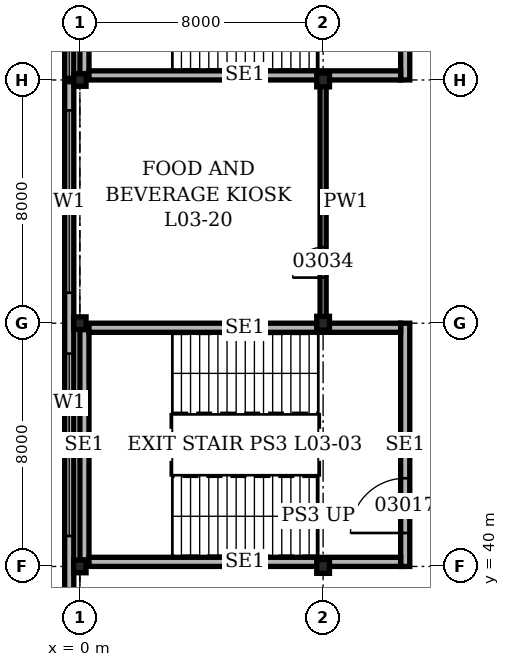
"""IFC4 building model, lengths in metres.
Left out: names, types, materials, properties, quantities, classifications, styles, units other than length and angle.
Written with IfcOpenShell. Run it as: python <this file> out.ifc"""

import sys

from ifc_helpers import new_model, si_unit, direction, frame, frame_2d, origin, origin_2d, place, context, subcontext, project, spatial, rectangle, i_section, extrude, element, fill, save


model = new_model("IFC4")
c1 = context("Model", 3, precision=1e-05, world=origin(), true_north=direction((0.0, 1.0)))
c2 = subcontext(c1, "Body", "Model", "MODEL_VIEW")
j1 = project(units=[si_unit("LENGTHUNIT", "METRE"), si_unit("PLANEANGLEUNIT", "RADIAN")], contexts=[c1])
p1 = place(None, origin())
s1 = spatial("IfcSite", under=j1, at=p1, CompositionType="ELEMENT")
p2 = place(p1, origin())
s2 = spatial("IfcBuilding", under=s1, at=p2, CompositionType="ELEMENT")
p3 = place(p2, frame((0.0, 0.0, 14.9)))
s3 = spatial("IfcBuildingStorey", under=s2, at=p3, CompositionType="ELEMENT", Elevation=14.9)
for number, where, z_axis, x_axis in (
    (1, (0.0, 40.0, 0.0), (0.0, 0.0, 1.0), (1.0, 0.0, 0.0)),
    (2, (0.0, 48.0, 0.0), (0.0, 0.0, 1.0), (1.0, 0.0, 0.0)),
    (3, (0.0, 56.0, 0.0), (0.0, 0.0, 1.0), (1.0, 0.0, 0.0)),
):
    element("IfcColumn", number, at=place(p3, frame(where, z_axis=z_axis, x_axis=x_axis)), inside=s3, PredefinedType="COLUMN", context=c2, shape_type="SweptSolid", body=[
        extrude(i_section(OverallWidth=0.406, OverallDepth=0.417, WebThickness=0.03, FlangeThickness=0.048, at=origin_2d()), origin(), (0.0, 0.0, 1.0), 5.0),
    ])
for number, where, z_axis, x_axis in (
    (4, (8.0, 40.0, 0.0), (0.0, 0.0, 1.0), (1.0, 0.0, 0.0)),
    (5, (8.0, 48.0, 0.0), (0.0, 0.0, 1.0), (1.0, 0.0, 0.0)),
    (6, (8.0, 56.0, 0.0), (0.0, 0.0, 1.0), (1.0, 0.0, 0.0)),
):
    element("IfcColumn", number, at=place(p3, frame(where, z_axis=z_axis, x_axis=x_axis)), inside=s3, PredefinedType="COLUMN", context=c2, shape_type="SweptSolid", body=[
        extrude(i_section(OverallWidth=0.419, OverallDepth=0.455, WebThickness=0.042, FlangeThickness=0.068, at=origin_2d()), origin(), (0.0, 0.0, 1.0), 5.0),
    ])
p4 = place(p3, frame((-0.35, 112.35, 0.0), z_axis=(0.0, 0.0, 1.0), x_axis=(0.0, -1.0, 0.0)))
e7 = element("IfcWall", 7, at=p4, inside=s3, PredefinedType="SOLIDWALL", context=c2, shape_type="SweptSolid", body=[
    extrude(rectangle(XDim=112.7, YDim=0.3, at=frame_2d((56.35, 0.0))), origin(), (0.0, 0.0, 1.0), 5.0),
])
p5 = place(p4, frame((1.35, 0.0, 1.0)))
e8 = element("IfcOpeningElement", 8, at=p5, cuts=e7, PredefinedType="OPENING", context=c2, shape_type="SweptSolid", body=[
    extrude(rectangle(XDim=6.0, YDim=1.5, at=frame_2d((3.0, 0.75))), frame((0.0, 0.16, 0.0), z_axis=(0.0, -1.0, 0.0), x_axis=(1.0, 0.0, 0.0)), (0.0, 0.0, 1.0), 0.32),
])
p6 = place(p4, frame((9.35, 0.0, 1.0)))
e9 = element("IfcOpeningElement", 9, at=p6, cuts=e7, PredefinedType="OPENING", context=c2, shape_type="SweptSolid", body=[
    extrude(rectangle(XDim=6.0, YDim=1.5, at=frame_2d((3.0, 0.75))), frame((0.0, 0.16, 0.0), z_axis=(0.0, -1.0, 0.0), x_axis=(1.0, 0.0, 0.0)), (0.0, 0.0, 1.0), 0.32),
])
p7 = place(p4, frame((17.35, 0.0, 1.0)))
e10 = element("IfcOpeningElement", 10, at=p7, cuts=e7, PredefinedType="OPENING", context=c2, shape_type="SweptSolid", body=[
    extrude(rectangle(XDim=6.0, YDim=1.5, at=frame_2d((3.0, 0.75))), frame((0.0, 0.16, 0.0), z_axis=(0.0, -1.0, 0.0), x_axis=(1.0, 0.0, 0.0)), (0.0, 0.0, 1.0), 0.32),
])
p8 = place(p4, frame((25.35, 0.0, 1.0)))
e11 = element("IfcOpeningElement", 11, at=p8, cuts=e7, PredefinedType="OPENING", context=c2, shape_type="SweptSolid", body=[
    extrude(rectangle(XDim=6.0, YDim=1.5, at=frame_2d((3.0, 0.75))), frame((0.0, 0.16, 0.0), z_axis=(0.0, -1.0, 0.0), x_axis=(1.0, 0.0, 0.0)), (0.0, 0.0, 1.0), 0.32),
])
p9 = place(p4, frame((33.35, 0.0, 1.0)))
e12 = element("IfcOpeningElement", 12, at=p9, cuts=e7, PredefinedType="OPENING", context=c2, shape_type="SweptSolid", body=[
    extrude(rectangle(XDim=6.0, YDim=1.5, at=frame_2d((3.0, 0.75))), frame((0.0, 0.16, 0.0), z_axis=(0.0, -1.0, 0.0), x_axis=(1.0, 0.0, 0.0)), (0.0, 0.0, 1.0), 0.32),
])
p10 = place(p4, frame((41.35, 0.0, 1.0)))
e13 = element("IfcOpeningElement", 13, at=p10, cuts=e7, PredefinedType="OPENING", context=c2, shape_type="SweptSolid", body=[
    extrude(rectangle(XDim=6.0, YDim=1.5, at=frame_2d((3.0, 0.75))), frame((0.0, 0.16, 0.0), z_axis=(0.0, -1.0, 0.0), x_axis=(1.0, 0.0, 0.0)), (0.0, 0.0, 1.0), 0.32),
])
p11 = place(p4, frame((49.35, 0.0, 1.0)))
e14 = element("IfcOpeningElement", 14, at=p11, cuts=e7, PredefinedType="OPENING", context=c2, shape_type="SweptSolid", body=[
    extrude(rectangle(XDim=6.0, YDim=1.5, at=frame_2d((3.0, 0.75))), frame((0.0, 0.16, 0.0), z_axis=(0.0, -1.0, 0.0), x_axis=(1.0, 0.0, 0.0)), (0.0, 0.0, 1.0), 0.32),
])
p12 = place(p4, frame((57.35, 0.0, 1.0)))
e15 = element("IfcOpeningElement", 15, at=p12, cuts=e7, PredefinedType="OPENING", context=c2, shape_type="SweptSolid", body=[
    extrude(rectangle(XDim=6.0, YDim=1.5, at=frame_2d((3.0, 0.75))), frame((0.0, 0.16, 0.0), z_axis=(0.0, -1.0, 0.0), x_axis=(1.0, 0.0, 0.0)), (0.0, 0.0, 1.0), 0.32),
])
p13 = place(p4, frame((65.35, 0.0, 1.0)))
e16 = element("IfcOpeningElement", 16, at=p13, cuts=e7, PredefinedType="OPENING", context=c2, shape_type="SweptSolid", body=[
    extrude(rectangle(XDim=6.0, YDim=1.5, at=frame_2d((3.0, 0.75))), frame((0.0, 0.16, 0.0), z_axis=(0.0, -1.0, 0.0), x_axis=(1.0, 0.0, 0.0)), (0.0, 0.0, 1.0), 0.32),
])
p14 = place(p4, frame((73.35, 0.0, 1.0)))
e17 = element("IfcOpeningElement", 17, at=p14, cuts=e7, PredefinedType="OPENING", context=c2, shape_type="SweptSolid", body=[
    extrude(rectangle(XDim=6.0, YDim=1.5, at=frame_2d((3.0, 0.75))), frame((0.0, 0.16, 0.0), z_axis=(0.0, -1.0, 0.0), x_axis=(1.0, 0.0, 0.0)), (0.0, 0.0, 1.0), 0.32),
])
p15 = place(p4, frame((81.35, 0.0, 1.0)))
e18 = element("IfcOpeningElement", 18, at=p15, cuts=e7, PredefinedType="OPENING", context=c2, shape_type="SweptSolid", body=[
    extrude(rectangle(XDim=6.0, YDim=1.5, at=frame_2d((3.0, 0.75))), frame((0.0, 0.16, 0.0), z_axis=(0.0, -1.0, 0.0), x_axis=(1.0, 0.0, 0.0)), (0.0, 0.0, 1.0), 0.32),
])
p16 = place(p4, frame((89.35, 0.0, 1.0)))
e19 = element("IfcOpeningElement", 19, at=p16, cuts=e7, PredefinedType="OPENING", context=c2, shape_type="SweptSolid", body=[
    extrude(rectangle(XDim=6.0, YDim=1.5, at=frame_2d((3.0, 0.75))), frame((0.0, 0.16, 0.0), z_axis=(0.0, -1.0, 0.0), x_axis=(1.0, 0.0, 0.0)), (0.0, 0.0, 1.0), 0.32),
])
p17 = place(p4, frame((97.35, 0.0, 1.0)))
e20 = element("IfcOpeningElement", 20, at=p17, cuts=e7, PredefinedType="OPENING", context=c2, shape_type="SweptSolid", body=[
    extrude(rectangle(XDim=6.0, YDim=1.5, at=frame_2d((3.0, 0.75))), frame((0.0, 0.16, 0.0), z_axis=(0.0, -1.0, 0.0), x_axis=(1.0, 0.0, 0.0)), (0.0, 0.0, 1.0), 0.32),
])
p18 = place(p4, frame((105.35, 0.0, 1.0)))
e21 = element("IfcOpeningElement", 21, at=p18, cuts=e7, PredefinedType="OPENING", context=c2, shape_type="SweptSolid", body=[
    extrude(rectangle(XDim=6.0, YDim=1.5, at=frame_2d((3.0, 0.75))), frame((0.0, 0.16, 0.0), z_axis=(0.0, -1.0, 0.0), x_axis=(1.0, 0.0, 0.0)), (0.0, 0.0, 1.0), 0.32),
])
p19 = place(p3, frame((0.15, 40.208, 0.0), z_axis=(0.0, 0.0, 1.0), x_axis=(0.0, 1.0, 0.0)))
e22 = element("IfcWall", 22, at=p19, inside=s3, PredefinedType="SOLIDWALL", context=c2, shape_type="SweptSolid", body=[
    extrude(rectangle(XDim=7.583, YDim=0.3, at=frame_2d((3.792, 0.0))), origin(), (0.0, 0.0, 1.0), 4.8),
])
p20 = place(p3, frame((10.7, 40.0, 0.0), z_axis=(0.0, 0.0, 1.0), x_axis=(0.0, 1.0, 0.0)))
e23 = element("IfcWall", 23, at=p20, inside=s3, PredefinedType="SOLIDWALL", context=c2, shape_type="SweptSolid", body=[
    extrude(rectangle(XDim=8.0, YDim=0.3, at=frame_2d((4.0, 0.0))), origin(), (0.0, 0.0, 1.0), 4.8),
])
p21 = place(p20, frame((1.1, 0.0, 0.0)))
e24 = element("IfcOpeningElement", 24, at=p21, cuts=e23, PredefinedType="OPENING", context=c2, shape_type="SweptSolid", body=[
    extrude(rectangle(XDim=1.8, YDim=2.1, at=frame_2d((0.9, 1.05))), frame((0.0, 0.16, 0.0), z_axis=(0.0, -1.0, 0.0), x_axis=(1.0, 0.0, 0.0)), (0.0, 0.0, 1.0), 0.32),
])
for number, where, z_axis, x_axis in (
    (25, (0.3, 40.15, 0.0), (0.0, 0.0, 1.0), (1.0, 0.0, 0.0)),
    (26, (0.3, 47.85, 0.0), (0.0, 0.0, 1.0), (1.0, 0.0, 0.0)),
):
    element("IfcWall", number, at=place(p3, frame(where, z_axis=z_axis, x_axis=x_axis)), inside=s3, PredefinedType="SOLIDWALL", context=c2, shape_type="SweptSolid", body=[
        extrude(rectangle(XDim=10.25, YDim=0.3, at=frame_2d((5.125, 0.0))), origin(), (0.0, 0.0, 1.0), 4.8),
    ])
p22 = place(p3, frame((0.15, 56.208, 0.0), z_axis=(0.0, 0.0, 1.0), x_axis=(0.0, 1.0, 0.0)))
e27 = element("IfcWall", 27, at=p22, inside=s3, PredefinedType="SOLIDWALL", context=c2, shape_type="SweptSolid", body=[
    extrude(rectangle(XDim=7.583, YDim=0.3, at=frame_2d((3.792, 0.0))), origin(), (0.0, 0.0, 1.0), 4.8),
])
p23 = place(p3, frame((10.7, 56.0, 0.0), z_axis=(0.0, 0.0, 1.0), x_axis=(0.0, 1.0, 0.0)))
e28 = element("IfcWall", 28, at=p23, inside=s3, PredefinedType="SOLIDWALL", context=c2, shape_type="SweptSolid", body=[
    extrude(rectangle(XDim=8.0, YDim=0.3, at=frame_2d((4.0, 0.0))), origin(), (0.0, 0.0, 1.0), 4.8),
])
p24 = place(p23, frame((1.1, 0.0, 0.0)))
e29 = element("IfcOpeningElement", 29, at=p24, cuts=e28, PredefinedType="OPENING", context=c2, shape_type="SweptSolid", body=[
    extrude(rectangle(XDim=1.8, YDim=2.1, at=frame_2d((0.9, 1.05))), frame((0.0, 0.16, 0.0), z_axis=(0.0, -1.0, 0.0), x_axis=(1.0, 0.0, 0.0)), (0.0, 0.0, 1.0), 0.32),
])
p25 = place(p3, frame((0.3, 56.15, 0.0), z_axis=(0.0, 0.0, 1.0), x_axis=(1.0, 0.0, 0.0)))
e30 = element("IfcWall", 30, at=p25, inside=s3, PredefinedType="SOLIDWALL", context=c2, shape_type="SweptSolid", body=[
    extrude(rectangle(XDim=10.25, YDim=0.3, at=frame_2d((5.125, 0.0))), origin(), (0.0, 0.0, 1.0), 4.8),
])
p26 = place(p3, frame((8.0, 48.1, 0.0), z_axis=(0.0, 0.0, 1.0), x_axis=(0.0, 1.0, 0.0)))
e31 = element("IfcWall", 31, at=p26, inside=s3, PredefinedType="PARTITIONING", context=c2, shape_type="SweptSolid", body=[
    extrude(rectangle(XDim=7.8, YDim=0.2, at=frame_2d((3.9, 0.0))), origin(), (0.0, 0.0, 1.0), 4.028),
])
p27 = place(p26, frame((1.4, 0.0, 0.0)))
e32 = element("IfcOpeningElement", 32, at=p27, cuts=e31, PredefinedType="OPENING", context=c2, shape_type="SweptSolid", body=[
    extrude(rectangle(XDim=1.0, YDim=2.1, at=frame_2d((0.5, 1.05))), frame((0.0, 0.11, 0.0), z_axis=(0.0, -1.0, 0.0), x_axis=(1.0, 0.0, 0.0)), (0.0, 0.0, 1.0), 0.22),
])
p28 = place(p12, origin())
e33 = element("IfcWindow", 33, at=p28, inside=s3, PartitioningType="SINGLE_PANEL", PredefinedType="WINDOW", context=c2, shape_type="SweptSolid", body=[
    extrude(rectangle(XDim=6.0, YDim=1.5, at=frame_2d((3.0, 0.75))), frame((0.0, 0.03, 0.0), z_axis=(0.0, -1.0, 0.0), x_axis=(1.0, 0.0, 0.0)), (0.0, 0.0, 1.0), 0.06),
])
fill(e15, e33)
p29 = place(p13, origin())
e34 = element("IfcWindow", 34, at=p29, inside=s3, PartitioningType="SINGLE_PANEL", PredefinedType="WINDOW", context=c2, shape_type="SweptSolid", body=[
    extrude(rectangle(XDim=6.0, YDim=1.5, at=frame_2d((3.0, 0.75))), frame((0.0, 0.03, 0.0), z_axis=(0.0, -1.0, 0.0), x_axis=(1.0, 0.0, 0.0)), (0.0, 0.0, 1.0), 0.06),
])
fill(e16, e34)
p30 = place(p21, origin())
e35 = element("IfcDoor", 35, at=p30, inside=s3, OperationType="DOUBLE_DOOR_SINGLE_SWING", PredefinedType="DOOR", context=c2, shape_type="SweptSolid", body=[
    extrude(rectangle(XDim=1.8, YDim=2.1, at=frame_2d((0.9, 1.05))), frame((0.0, 0.15, 0.0), z_axis=(0.0, -1.0, 0.0), x_axis=(1.0, 0.0, 0.0)), (0.0, 0.0, 1.0), 0.3),
])
fill(e24, e35)
p31 = place(p27, origin())
e36 = element("IfcDoor", 36, at=p31, inside=s3, OperationType="SINGLE_SWING_LEFT", PredefinedType="DOOR", context=c2, shape_type="SweptSolid", body=[
    extrude(rectangle(XDim=1.0, YDim=2.1, at=frame_2d((0.5, 1.05))), frame((0.0, 0.1, 0.0), z_axis=(0.0, -1.0, 0.0), x_axis=(1.0, 0.0, 0.0)), (0.0, 0.0, 1.0), 0.199),
])
fill(e32, e36)
save(model, sys.argv[1])
